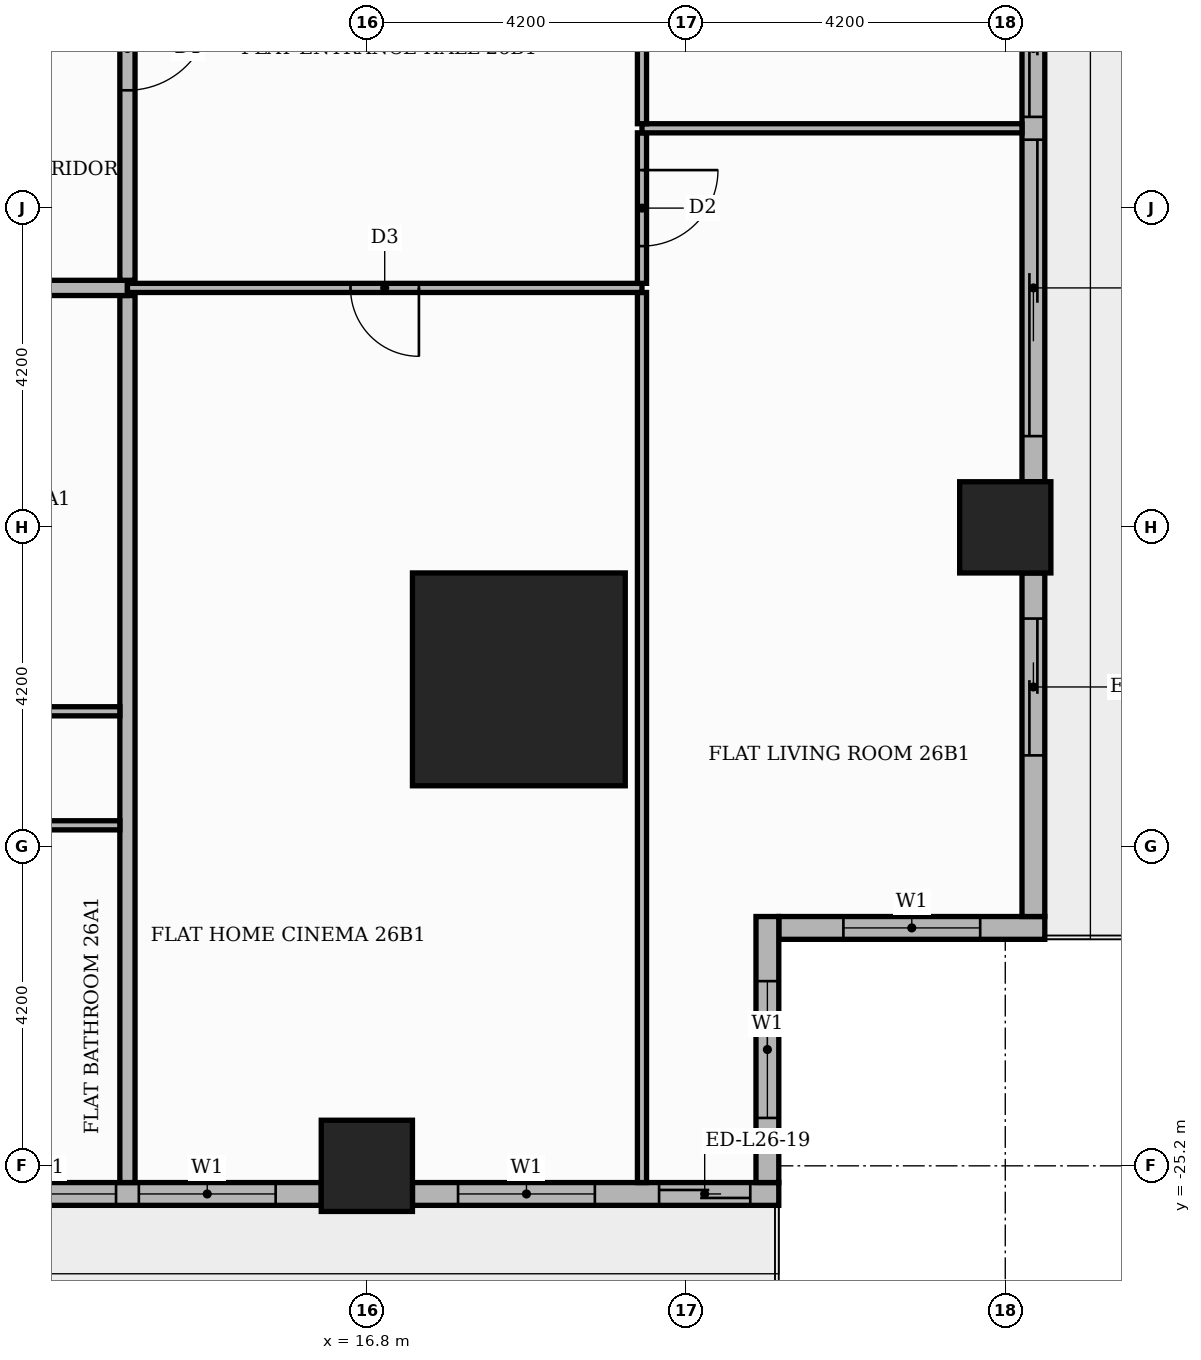
"""IFC4 building model, lengths in metres.
Left out: names, types, materials, properties, quantities, classifications, styles, units other than length and angle.
Written with IfcOpenShell. Run it as: python <this file> out.ifc"""

import sys

from ifc_helpers import new_model, si_unit, direction, frame, frame_2d, origin, origin_2d, place, context, subcontext, project, spatial, rectangle, extrude, element, fill, save


model = new_model("IFC4")
c1 = context("Model", 3, precision=1e-05, world=origin(), true_north=direction((0.0, 1.0)))
c2 = subcontext(c1, "Body", "Model", "MODEL_VIEW")
j1 = project(units=[si_unit("LENGTHUNIT", "METRE"), si_unit("PLANEANGLEUNIT", "RADIAN")], contexts=[c1])
p1 = place(None, origin())
s1 = spatial("IfcSite", under=j1, at=p1, CompositionType="ELEMENT")
p2 = place(p1, origin())
s2 = spatial("IfcBuilding", under=s1, at=p2, CompositionType="ELEMENT")
p3 = place(p2, frame((0.0, 0.0, 110.4)))
s3 = spatial("IfcBuildingStorey", under=s2, at=p3, CompositionType="ELEMENT", Elevation=110.4)
p4 = place(p3, frame((18.8, -18.8, 0.0), z_axis=(0.0, 0.0, 1.0), x_axis=(1.0, 0.0, 0.0)))
e1 = element("IfcColumn", 1, at=p4, inside=s3, PredefinedType="COLUMN", context=c2, shape_type="SweptSolid", body=[
    extrude(rectangle(XDim=2.8, YDim=2.8, at=origin_2d()), origin(), (0.0, 0.0, 1.0), 3.9),
])
for number, where, z_axis, x_axis in (
    (2, (25.2, -16.8, 0.0), (0.0, 0.0, 1.0), (1.0, 0.0, 0.0)),
    (3, (16.8, -25.2, 0.0), (0.0, 0.0, 1.0), (1.0, 0.0, 0.0)),
):
    element("IfcColumn", number, at=place(p3, frame(where, z_axis=z_axis, x_axis=x_axis)), inside=s3, PredefinedType="COLUMN", context=c2, shape_type="SweptSolid", body=[
        extrude(rectangle(XDim=1.2, YDim=1.2, at=origin_2d()), origin(), (0.0, 0.0, 1.0), 3.9),
    ])
p5 = place(p3, frame((22.22, -22.07, 0.0), z_axis=(0.0, 0.0, 1.0), x_axis=(1.0, 0.0, 0.0)))
e4 = element("IfcWall", 4, at=p5, inside=s3, PredefinedType="STANDARD", context=c2, shape_type="SweptSolid", body=[
    extrude(rectangle(XDim=3.5, YDim=0.3, at=frame_2d((1.75, 0.0))), origin(), (0.0, 0.0, 1.0), 3.48),
])
p6 = place(p5, frame((0.85, 0.0, 0.9)))
e5 = element("IfcOpeningElement", 5, at=p6, cuts=e4, PredefinedType="OPENING", context=c2, shape_type="SweptSolid", body=[
    extrude(rectangle(XDim=1.8, YDim=2.1, at=frame_2d((0.9, 1.05))), frame((0.0, 0.16, 0.0), z_axis=(0.0, -1.0, 0.0), x_axis=(1.0, 0.0, 0.0)), (0.0, 0.0, 1.0), 0.32),
])
p7 = place(p3, frame((25.57, -21.92, 0.0), z_axis=(0.0, 0.0, 1.0), x_axis=(0.0, 1.0, 0.0)))
e6 = element("IfcWall", 6, at=p7, inside=s3, PredefinedType="STANDARD", context=c2, shape_type="SweptSolid", body=[
    extrude(rectangle(XDim=4.52, YDim=0.3, at=frame_2d((2.26, 0.0))), origin(), (0.0, 0.0, 1.0), 3.48),
])
p8 = place(p7, frame((2.12, 0.0, 0.0)))
e7 = element("IfcOpeningElement", 7, at=p8, cuts=e6, PredefinedType="OPENING", context=c2, shape_type="SweptSolid", body=[
    extrude(rectangle(XDim=1.8, YDim=2.4, at=frame_2d((0.9, 1.2))), frame((0.0, 0.16, 0.0), z_axis=(0.0, -1.0, 0.0), x_axis=(1.0, 0.0, 0.0)), (0.0, 0.0, 1.0), 0.32),
])
p9 = place(p3, frame((25.57, -16.2, 0.0), z_axis=(0.0, 0.0, 1.0), x_axis=(0.0, 1.0, 0.0)))
e8 = element("IfcWall", 8, at=p9, inside=s3, PredefinedType="STANDARD", context=c2, shape_type="SweptSolid", body=[
    extrude(rectangle(XDim=7.2, YDim=0.3, at=frame_2d((3.6, 0.0))), origin(), (0.0, 0.0, 1.0), 3.48),
])
p10 = place(p9, frame((0.6, 0.0, 0.0)))
e9 = element("IfcOpeningElement", 9, at=p10, cuts=e8, PredefinedType="OPENING", context=c2, shape_type="SweptSolid", body=[
    extrude(rectangle(XDim=3.9, YDim=2.4, at=frame_2d((1.95, 1.2))), frame((0.0, 0.16, 0.0), z_axis=(0.0, -1.0, 0.0), x_axis=(1.0, 0.0, 0.0)), (0.0, 0.0, 1.0), 0.32),
])
p11 = place(p9, frame((4.8, 0.0, 0.0)))
e10 = element("IfcOpeningElement", 10, at=p11, cuts=e8, PredefinedType="OPENING", context=c2, shape_type="SweptSolid", body=[
    extrude(rectangle(XDim=1.8, YDim=2.4, at=frame_2d((0.9, 1.2))), frame((0.0, 0.16, 0.0), z_axis=(0.0, -1.0, 0.0), x_axis=(1.0, 0.0, 0.0)), (0.0, 0.0, 1.0), 0.32),
])
p12 = place(p3, frame((9.0, -25.57, 0.0), z_axis=(0.0, 0.0, 1.0), x_axis=(1.0, 0.0, 0.0)))
e11 = element("IfcWall", 11, at=p12, inside=s3, PredefinedType="STANDARD", context=c2, shape_type="SweptSolid", body=[
    extrude(rectangle(XDim=7.2, YDim=0.3, at=frame_2d((3.6, 0.0))), origin(), (0.0, 0.0, 1.0), 3.48),
])
p13 = place(p12, frame((0.6, 0.0, 0.9)))
e12 = element("IfcOpeningElement", 12, at=p13, cuts=e11, PredefinedType="OPENING", context=c2, shape_type="SweptSolid", body=[
    extrude(rectangle(XDim=1.8, YDim=2.1, at=frame_2d((0.9, 1.05))), frame((0.0, 0.16, 0.0), z_axis=(0.0, -1.0, 0.0), x_axis=(1.0, 0.0, 0.0)), (0.0, 0.0, 1.0), 0.32),
])
p14 = place(p12, frame((2.7, 0.0, 0.9)))
e13 = element("IfcOpeningElement", 13, at=p14, cuts=e11, PredefinedType="OPENING", context=c2, shape_type="SweptSolid", body=[
    extrude(rectangle(XDim=1.8, YDim=2.1, at=frame_2d((0.9, 1.05))), frame((0.0, 0.16, 0.0), z_axis=(0.0, -1.0, 0.0), x_axis=(1.0, 0.0, 0.0)), (0.0, 0.0, 1.0), 0.32),
])
p15 = place(p12, frame((4.8, 0.0, 0.9)))
e14 = element("IfcOpeningElement", 14, at=p15, cuts=e11, PredefinedType="OPENING", context=c2, shape_type="SweptSolid", body=[
    extrude(rectangle(XDim=1.8, YDim=2.1, at=frame_2d((0.9, 1.05))), frame((0.0, 0.16, 0.0), z_axis=(0.0, -1.0, 0.0), x_axis=(1.0, 0.0, 0.0)), (0.0, 0.0, 1.0), 0.32),
])
p16 = place(p3, frame((17.4, -25.57, 0.0), z_axis=(0.0, 0.0, 1.0), x_axis=(1.0, 0.0, 0.0)))
e15 = element("IfcWall", 15, at=p16, inside=s3, PredefinedType="STANDARD", context=c2, shape_type="SweptSolid", body=[
    extrude(rectangle(XDim=4.82, YDim=0.3, at=frame_2d((2.41, 0.0))), origin(), (0.0, 0.0, 1.0), 3.48),
])
p17 = place(p16, frame((0.6, 0.0, 0.9)))
e16 = element("IfcOpeningElement", 16, at=p17, cuts=e15, PredefinedType="OPENING", context=c2, shape_type="SweptSolid", body=[
    extrude(rectangle(XDim=1.8, YDim=2.1, at=frame_2d((0.9, 1.05))), frame((0.0, 0.16, 0.0), z_axis=(0.0, -1.0, 0.0), x_axis=(1.0, 0.0, 0.0)), (0.0, 0.0, 1.0), 0.32),
])
p18 = place(p16, frame((3.245, 0.0, 0.0)))
e17 = element("IfcOpeningElement", 17, at=p18, cuts=e15, PredefinedType="OPENING", context=c2, shape_type="SweptSolid", body=[
    extrude(rectangle(XDim=1.2, YDim=2.4, at=frame_2d((0.6, 1.2))), frame((0.0, 0.16, 0.0), z_axis=(0.0, -1.0, 0.0), x_axis=(1.0, 0.0, 0.0)), (0.0, 0.0, 1.0), 0.32),
])
p19 = place(p3, frame((22.07, -25.42, 0.0), z_axis=(0.0, 0.0, 1.0), x_axis=(0.0, 1.0, 0.0)))
e18 = element("IfcWall", 18, at=p19, inside=s3, PredefinedType="STANDARD", context=c2, shape_type="SweptSolid", body=[
    extrude(rectangle(XDim=3.5, YDim=0.3, at=frame_2d((1.75, 0.0))), origin(), (0.0, 0.0, 1.0), 3.48),
])
p20 = place(p19, frame((0.85, 0.0, 0.9)))
e19 = element("IfcOpeningElement", 19, at=p20, cuts=e18, PredefinedType="OPENING", context=c2, shape_type="SweptSolid", body=[
    extrude(rectangle(XDim=1.8, YDim=2.1, at=frame_2d((0.9, 1.05))), frame((0.0, 0.16, 0.0), z_axis=(0.0, -1.0, 0.0), x_axis=(1.0, 0.0, 0.0)), (0.0, 0.0, 1.0), 0.32),
])
p21 = place(p3, frame((13.65, -25.42, 0.0), z_axis=(0.0, 0.0, 1.0), x_axis=(0.0, 1.0, 0.0)))
e20 = element("IfcWall", 20, at=p21, inside=s3, PredefinedType="PARTITIONING", context=c2, shape_type="SweptSolid", body=[
    extrude(rectangle(XDim=11.67, YDim=0.2, at=frame_2d((5.835, 0.0))), origin(), (0.0, 0.0, 1.0), 3.48),
])
p22 = place(p3, frame((20.42, -25.42, 0.0), z_axis=(0.0, 0.0, 1.0), x_axis=(0.0, 1.0, 0.0)))
e21 = element("IfcWall", 21, at=p22, inside=s3, PredefinedType="PARTITIONING", context=c2, shape_type="SweptSolid", body=[
    extrude(rectangle(XDim=11.71, YDim=0.12, at=frame_2d((5.855, 0.0))), origin(), (0.0, 0.0, 1.0), 3.48),
])
p23 = place(p3, frame((-25.42, -20.72, 0.0), z_axis=(0.0, 0.0, 1.0), x_axis=(1.0, 0.0, 0.0)))
e22 = element("IfcWall", 22, at=p23, inside=s3, PredefinedType="PARTITIONING", context=c2, shape_type="SweptSolid", body=[
    extrude(rectangle(XDim=38.97, YDim=0.12, at=frame_2d((19.485, 0.0))), origin(), (0.0, 0.0, 1.0), 3.48),
])
p24 = place(p23, frame((10.22, 0.0, 0.0)))
e23 = element("IfcOpeningElement", 23, at=p24, cuts=e22, PredefinedType="OPENING", context=c2, shape_type="SweptSolid", body=[
    extrude(rectangle(XDim=1.0, YDim=2.1, at=frame_2d((0.5, 1.05))), frame((0.0, 0.07, 0.0), z_axis=(0.0, -1.0, 0.0), x_axis=(1.0, 0.0, 0.0)), (0.0, 0.0, 1.0), 0.14),
])
p25 = place(p23, frame((14.47, 0.0, 0.0)))
e24 = element("IfcOpeningElement", 24, at=p25, cuts=e22, PredefinedType="OPENING", context=c2, shape_type="SweptSolid", body=[
    extrude(rectangle(XDim=0.9, YDim=2.1, at=frame_2d((0.45, 1.05))), frame((0.0, 0.07, 0.0), z_axis=(0.0, -1.0, 0.0), x_axis=(1.0, 0.0, 0.0)), (0.0, 0.0, 1.0), 0.14),
])
p26 = place(p23, frame((23.92, 0.0, 0.0)))
e25 = element("IfcOpeningElement", 25, at=p26, cuts=e22, PredefinedType="OPENING", context=c2, shape_type="SweptSolid", body=[
    extrude(rectangle(XDim=0.9, YDim=2.1, at=frame_2d((0.45, 1.05))), frame((0.0, 0.07, 0.0), z_axis=(0.0, -1.0, 0.0), x_axis=(1.0, 0.0, 0.0)), (0.0, 0.0, 1.0), 0.14),
])
p27 = place(p23, frame((28.12, 0.0, 0.0)))
e26 = element("IfcOpeningElement", 26, at=p27, cuts=e22, PredefinedType="OPENING", context=c2, shape_type="SweptSolid", body=[
    extrude(rectangle(XDim=0.9, YDim=2.1, at=frame_2d((0.45, 1.05))), frame((0.0, 0.07, 0.0), z_axis=(0.0, -1.0, 0.0), x_axis=(1.0, 0.0, 0.0)), (0.0, 0.0, 1.0), 0.14),
])
p28 = place(p23, frame((34.42, 0.0, 0.0)))
e27 = element("IfcOpeningElement", 27, at=p28, cuts=e22, PredefinedType="OPENING", context=c2, shape_type="SweptSolid", body=[
    extrude(rectangle(XDim=0.9, YDim=2.1, at=frame_2d((0.45, 1.05))), frame((0.0, 0.07, 0.0), z_axis=(0.0, -1.0, 0.0), x_axis=(1.0, 0.0, 0.0)), (0.0, 0.0, 1.0), 0.14),
])
p29 = place(p3, frame((-9.45, -19.22, 0.0), z_axis=(0.0, 0.0, 1.0), x_axis=(1.0, 0.0, 0.0)))
e28 = element("IfcWall", 28, at=p29, inside=s3, PredefinedType="PARTITIONING", context=c2, shape_type="SweptSolid", body=[
    extrude(rectangle(XDim=23.0, YDim=0.12, at=frame_2d((11.5, 0.0))), origin(), (0.0, 0.0, 1.0), 3.48),
])
p30 = place(p29, frame((2.7, 0.0, 0.0)))
e29 = element("IfcOpeningElement", 29, at=p30, cuts=e28, PredefinedType="OPENING", context=c2, shape_type="SweptSolid", body=[
    extrude(rectangle(XDim=0.9, YDim=2.1, at=frame_2d((0.45, 1.05))), frame((0.0, 0.07, 0.0), z_axis=(0.0, -1.0, 0.0), x_axis=(1.0, 0.0, 0.0)), (0.0, 0.0, 1.0), 0.14),
])
p31 = place(p29, frame((8.85, 0.0, 0.0)))
e30 = element("IfcOpeningElement", 30, at=p31, cuts=e28, PredefinedType="OPENING", context=c2, shape_type="SweptSolid", body=[
    extrude(rectangle(XDim=0.9, YDim=2.1, at=frame_2d((0.45, 1.05))), frame((0.0, 0.07, 0.0), z_axis=(0.0, -1.0, 0.0), x_axis=(1.0, 0.0, 0.0)), (0.0, 0.0, 1.0), 0.14),
])
p32 = place(p29, frame((13.05, 0.0, 0.0)))
e31 = element("IfcOpeningElement", 31, at=p32, cuts=e28, PredefinedType="OPENING", context=c2, shape_type="SweptSolid", body=[
    extrude(rectangle(XDim=0.9, YDim=2.1, at=frame_2d((0.45, 1.05))), frame((0.0, 0.07, 0.0), z_axis=(0.0, -1.0, 0.0), x_axis=(1.0, 0.0, 0.0)), (0.0, 0.0, 1.0), 0.14),
])
p33 = place(p29, frame((16.35, 0.0, 0.0)))
e32 = element("IfcOpeningElement", 32, at=p33, cuts=e28, PredefinedType="OPENING", context=c2, shape_type="SweptSolid", body=[
    extrude(rectangle(XDim=0.9, YDim=2.1, at=frame_2d((0.45, 1.05))), frame((0.0, 0.07, 0.0), z_axis=(0.0, -1.0, 0.0), x_axis=(1.0, 0.0, 0.0)), (0.0, 0.0, 1.0), 0.14),
])
p34 = place(p29, frame((20.55, 0.0, 0.0)))
e33 = element("IfcOpeningElement", 33, at=p34, cuts=e28, PredefinedType="OPENING", context=c2, shape_type="SweptSolid", body=[
    extrude(rectangle(XDim=0.9, YDim=2.1, at=frame_2d((0.45, 1.05))), frame((0.0, 0.07, 0.0), z_axis=(0.0, -1.0, 0.0), x_axis=(1.0, 0.0, 0.0)), (0.0, 0.0, 1.0), 0.14),
])
p35 = place(p3, frame((-25.42, -13.65, 0.0), z_axis=(0.0, 0.0, 1.0), x_axis=(1.0, 0.0, 0.0)))
e34 = element("IfcWall", 34, at=p35, inside=s3, PredefinedType="PARTITIONING", context=c2, shape_type="SweptSolid", body=[
    extrude(rectangle(XDim=39.07, YDim=0.2, at=frame_2d((19.535, 0.0))), origin(), (0.0, 0.0, 1.0), 3.48),
])
p36 = place(p35, frame((13.32, 0.0, 0.0)))
e35 = element("IfcOpeningElement", 35, at=p36, cuts=e34, PredefinedType="OPENING", context=c2, shape_type="SweptSolid", body=[
    extrude(rectangle(XDim=1.1, YDim=2.4, at=frame_2d((0.55, 1.2))), frame((0.0, 0.11, 0.0), z_axis=(0.0, -1.0, 0.0), x_axis=(1.0, 0.0, 0.0)), (0.0, 0.0, 1.0), 0.22),
])
p37 = place(p3, frame((13.65, -13.65, 0.0), z_axis=(0.0, 0.0, 1.0), x_axis=(1.0, 0.0, 0.0)))
e36 = element("IfcWall", 36, at=p37, inside=s3, PredefinedType="PARTITIONING", context=c2, shape_type="SweptSolid", body=[
    extrude(rectangle(XDim=6.77, YDim=0.12, at=frame_2d((3.385, 0.0))), origin(), (0.0, 0.0, 1.0), 3.48),
])
p38 = place(p37, frame((2.935, 0.0, 0.0)))
e37 = element("IfcOpeningElement", 37, at=p38, cuts=e36, PredefinedType="OPENING", context=c2, shape_type="SweptSolid", body=[
    extrude(rectangle(XDim=0.9, YDim=2.1, at=frame_2d((0.45, 1.05))), frame((0.0, 0.07, 0.0), z_axis=(0.0, -1.0, 0.0), x_axis=(1.0, 0.0, 0.0)), (0.0, 0.0, 1.0), 0.14),
])
p39 = place(p3, frame((20.42, -13.59, 0.0), z_axis=(0.0, 0.0, 1.0), x_axis=(0.0, 1.0, 0.0)))
e38 = element("IfcWall", 38, at=p39, inside=s3, PredefinedType="PARTITIONING", context=c2, shape_type="SweptSolid", body=[
    extrude(rectangle(XDim=1.98, YDim=0.12, at=frame_2d((0.99, 0.0))), origin(), (0.0, 0.0, 1.0), 3.48),
])
p40 = place(p39, frame((0.49, 0.0, 0.0)))
e39 = element("IfcOpeningElement", 39, at=p40, cuts=e38, PredefinedType="OPENING", context=c2, shape_type="SweptSolid", body=[
    extrude(rectangle(XDim=1.0, YDim=2.1, at=frame_2d((0.5, 1.05))), frame((0.0, 0.07, 0.0), z_axis=(0.0, -1.0, 0.0), x_axis=(1.0, 0.0, 0.0)), (0.0, 0.0, 1.0), 0.14),
])
p41 = place(p3, frame((13.65, -13.55, 0.0), z_axis=(0.0, 0.0, 1.0), x_axis=(0.0, 1.0, 0.0)))
e40 = element("IfcWall", 40, at=p41, inside=s3, PredefinedType="PARTITIONING", context=c2, shape_type="SweptSolid", body=[
    extrude(rectangle(XDim=27.1, YDim=0.2, at=frame_2d((13.55, 0.0))), origin(), (0.0, 0.0, 1.0), 3.48),
])
p42 = place(p41, frame((2.5, 0.0, 0.0)))
e41 = element("IfcOpeningElement", 41, at=p42, cuts=e40, PredefinedType="OPENING", context=c2, shape_type="SweptSolid", body=[
    extrude(rectangle(XDim=1.1, YDim=2.4, at=frame_2d((0.55, 1.2))), frame((0.0, 0.11, 0.0), z_axis=(0.0, -1.0, 0.0), x_axis=(1.0, 0.0, 0.0)), (0.0, 0.0, 1.0), 0.22),
])
p43 = place(p3, frame((20.42, -11.55, 0.0), z_axis=(0.0, 0.0, 1.0), x_axis=(1.0, 0.0, 0.0)))
e42 = element("IfcWall", 42, at=p43, inside=s3, PredefinedType="PARTITIONING", context=c2, shape_type="SweptSolid", body=[
    extrude(rectangle(XDim=5.0, YDim=0.12, at=frame_2d((2.5, 0.0))), origin(), (0.0, 0.0, 1.0), 3.48),
])
p44 = place(p3, frame((20.42, -11.49, 0.0), z_axis=(0.0, 0.0, 1.0), x_axis=(0.0, 1.0, 0.0)))
e43 = element("IfcWall", 43, at=p44, inside=s3, PredefinedType="PARTITIONING", context=c2, shape_type="SweptSolid", body=[
    extrude(rectangle(XDim=4.08, YDim=0.12, at=frame_2d((2.04, 0.0))), origin(), (0.0, 0.0, 1.0), 3.48),
])
p45 = place(p44, frame((1.59, 0.0, 0.0)))
e44 = element("IfcOpeningElement", 44, at=p45, cuts=e43, PredefinedType="OPENING", context=c2, shape_type="SweptSolid", body=[
    extrude(rectangle(XDim=0.9, YDim=2.1, at=frame_2d((0.45, 1.05))), frame((0.0, 0.07, 0.0), z_axis=(0.0, -1.0, 0.0), x_axis=(1.0, 0.0, 0.0)), (0.0, 0.0, 1.0), 0.14),
])
p46 = place(p6, origin())
e45 = element("IfcWindow", 45, at=p46, inside=s3, PartitioningType="SINGLE_PANEL", PredefinedType="WINDOW", context=c2, shape_type="SweptSolid", body=[
    extrude(rectangle(XDim=1.8, YDim=2.1, at=frame_2d((0.9, 1.05))), frame((0.0, 0.03, 0.0), z_axis=(0.0, -1.0, 0.0), x_axis=(1.0, 0.0, 0.0)), (0.0, 0.0, 1.0), 0.06),
])
fill(e5, e45)
p47 = place(p8, origin())
e46 = element("IfcDoor", 46, at=p47, inside=s3, OperationType="SLIDING_TO_RIGHT", PredefinedType="DOOR", context=c2, shape_type="SweptSolid", body=[
    extrude(rectangle(XDim=1.8, YDim=2.4, at=frame_2d((0.9, 1.2))), frame((0.0, 0.025, 0.0), z_axis=(0.0, -1.0, 0.0), x_axis=(1.0, 0.0, 0.0)), (0.0, 0.0, 1.0), 0.05),
])
fill(e7, e46)
p48 = place(p10, origin())
e47 = element("IfcDoor", 47, at=p48, inside=s3, OperationType="SLIDING_TO_LEFT", PredefinedType="DOOR", context=c2, shape_type="SweptSolid", body=[
    extrude(rectangle(XDim=3.9, YDim=2.4, at=frame_2d((1.95, 1.2))), frame((0.0, 0.025, 0.0), z_axis=(0.0, -1.0, 0.0), x_axis=(1.0, 0.0, 0.0)), (0.0, 0.0, 1.0), 0.05),
])
fill(e9, e47)
p49 = place(p11, origin())
e48 = element("IfcDoor", 48, at=p49, inside=s3, OperationType="SLIDING_TO_RIGHT", PredefinedType="DOOR", context=c2, shape_type="SweptSolid", body=[
    extrude(rectangle(XDim=1.8, YDim=2.4, at=frame_2d((0.9, 1.2))), frame((0.0, 0.025, 0.0), z_axis=(0.0, -1.0, 0.0), x_axis=(1.0, 0.0, 0.0)), (0.0, 0.0, 1.0), 0.05),
])
fill(e10, e48)
p50 = place(p14, origin())
e49 = element("IfcWindow", 49, at=p50, inside=s3, PartitioningType="SINGLE_PANEL", PredefinedType="WINDOW", context=c2, shape_type="SweptSolid", body=[
    extrude(rectangle(XDim=1.8, YDim=2.1, at=frame_2d((0.9, 1.05))), frame((0.0, 0.03, 0.0), z_axis=(0.0, -1.0, 0.0), x_axis=(1.0, 0.0, 0.0)), (0.0, 0.0, 1.0), 0.06),
])
fill(e13, e49)
p51 = place(p15, origin())
e50 = element("IfcWindow", 50, at=p51, inside=s3, PartitioningType="SINGLE_PANEL", PredefinedType="WINDOW", context=c2, shape_type="SweptSolid", body=[
    extrude(rectangle(XDim=1.8, YDim=2.1, at=frame_2d((0.9, 1.05))), frame((0.0, 0.03, 0.0), z_axis=(0.0, -1.0, 0.0), x_axis=(1.0, 0.0, 0.0)), (0.0, 0.0, 1.0), 0.06),
])
fill(e14, e50)
p52 = place(p17, origin())
e51 = element("IfcWindow", 51, at=p52, inside=s3, PartitioningType="SINGLE_PANEL", PredefinedType="WINDOW", context=c2, shape_type="SweptSolid", body=[
    extrude(rectangle(XDim=1.8, YDim=2.1, at=frame_2d((0.9, 1.05))), frame((0.0, 0.03, 0.0), z_axis=(0.0, -1.0, 0.0), x_axis=(1.0, 0.0, 0.0)), (0.0, 0.0, 1.0), 0.06),
])
fill(e16, e51)
p53 = place(p18, origin())
e52 = element("IfcDoor", 52, at=p53, inside=s3, OperationType="SLIDING_TO_RIGHT", PredefinedType="DOOR", context=c2, shape_type="SweptSolid", body=[
    extrude(rectangle(XDim=1.2, YDim=2.4, at=frame_2d((0.6, 1.2))), frame((0.0, 0.025, 0.0), z_axis=(0.0, -1.0, 0.0), x_axis=(1.0, 0.0, 0.0)), (0.0, 0.0, 1.0), 0.05),
])
fill(e17, e52)
p54 = place(p20, origin())
e53 = element("IfcWindow", 53, at=p54, inside=s3, PartitioningType="SINGLE_PANEL", PredefinedType="WINDOW", context=c2, shape_type="SweptSolid", body=[
    extrude(rectangle(XDim=1.8, YDim=2.1, at=frame_2d((0.9, 1.05))), frame((0.0, 0.03, 0.0), z_axis=(0.0, -1.0, 0.0), x_axis=(1.0, 0.0, 0.0)), (0.0, 0.0, 1.0), 0.06),
])
fill(e19, e53)
p55 = place(p42, frame((1.1, 0.0, 0.0), z_axis=(0.0, 0.0, 1.0), x_axis=(-1.0, 0.0, 0.0)))
e54 = element("IfcDoor", 54, at=p55, inside=s3, OperationType="SINGLE_SWING_RIGHT", PredefinedType="DOOR", context=c2, shape_type="SweptSolid", body=[
    extrude(rectangle(XDim=1.1, YDim=2.4, at=frame_2d((0.55, 1.2))), frame((0.0, 0.025, 0.0), z_axis=(0.0, -1.0, 0.0), x_axis=(1.0, 0.0, 0.0)), (0.0, 0.0, 1.0), 0.05),
])
fill(e41, e54)
p56 = place(p38, frame((0.9, 0.0, 0.0), z_axis=(0.0, 0.0, 1.0), x_axis=(-1.0, 0.0, 0.0)))
e55 = element("IfcDoor", 55, at=p56, inside=s3, OperationType="SINGLE_SWING_RIGHT", PredefinedType="DOOR", context=c2, shape_type="SweptSolid", body=[
    extrude(rectangle(XDim=0.9, YDim=2.1, at=frame_2d((0.45, 1.05))), frame((0.0, 0.025, 0.0), z_axis=(0.0, -1.0, 0.0), x_axis=(1.0, 0.0, 0.0)), (0.0, 0.0, 1.0), 0.05),
])
fill(e37, e55)
p57 = place(p40, frame((1.0, 0.0, 0.0), z_axis=(0.0, 0.0, 1.0), x_axis=(-1.0, 0.0, 0.0)))
e56 = element("IfcDoor", 56, at=p57, inside=s3, OperationType="SINGLE_SWING_RIGHT", PredefinedType="DOOR", context=c2, shape_type="SweptSolid", body=[
    extrude(rectangle(XDim=1.0, YDim=2.1, at=frame_2d((0.5, 1.05))), frame((0.0, 0.025, 0.0), z_axis=(0.0, -1.0, 0.0), x_axis=(1.0, 0.0, 0.0)), (0.0, 0.0, 1.0), 0.05),
])
fill(e39, e56)
save(model, sys.argv[1])
